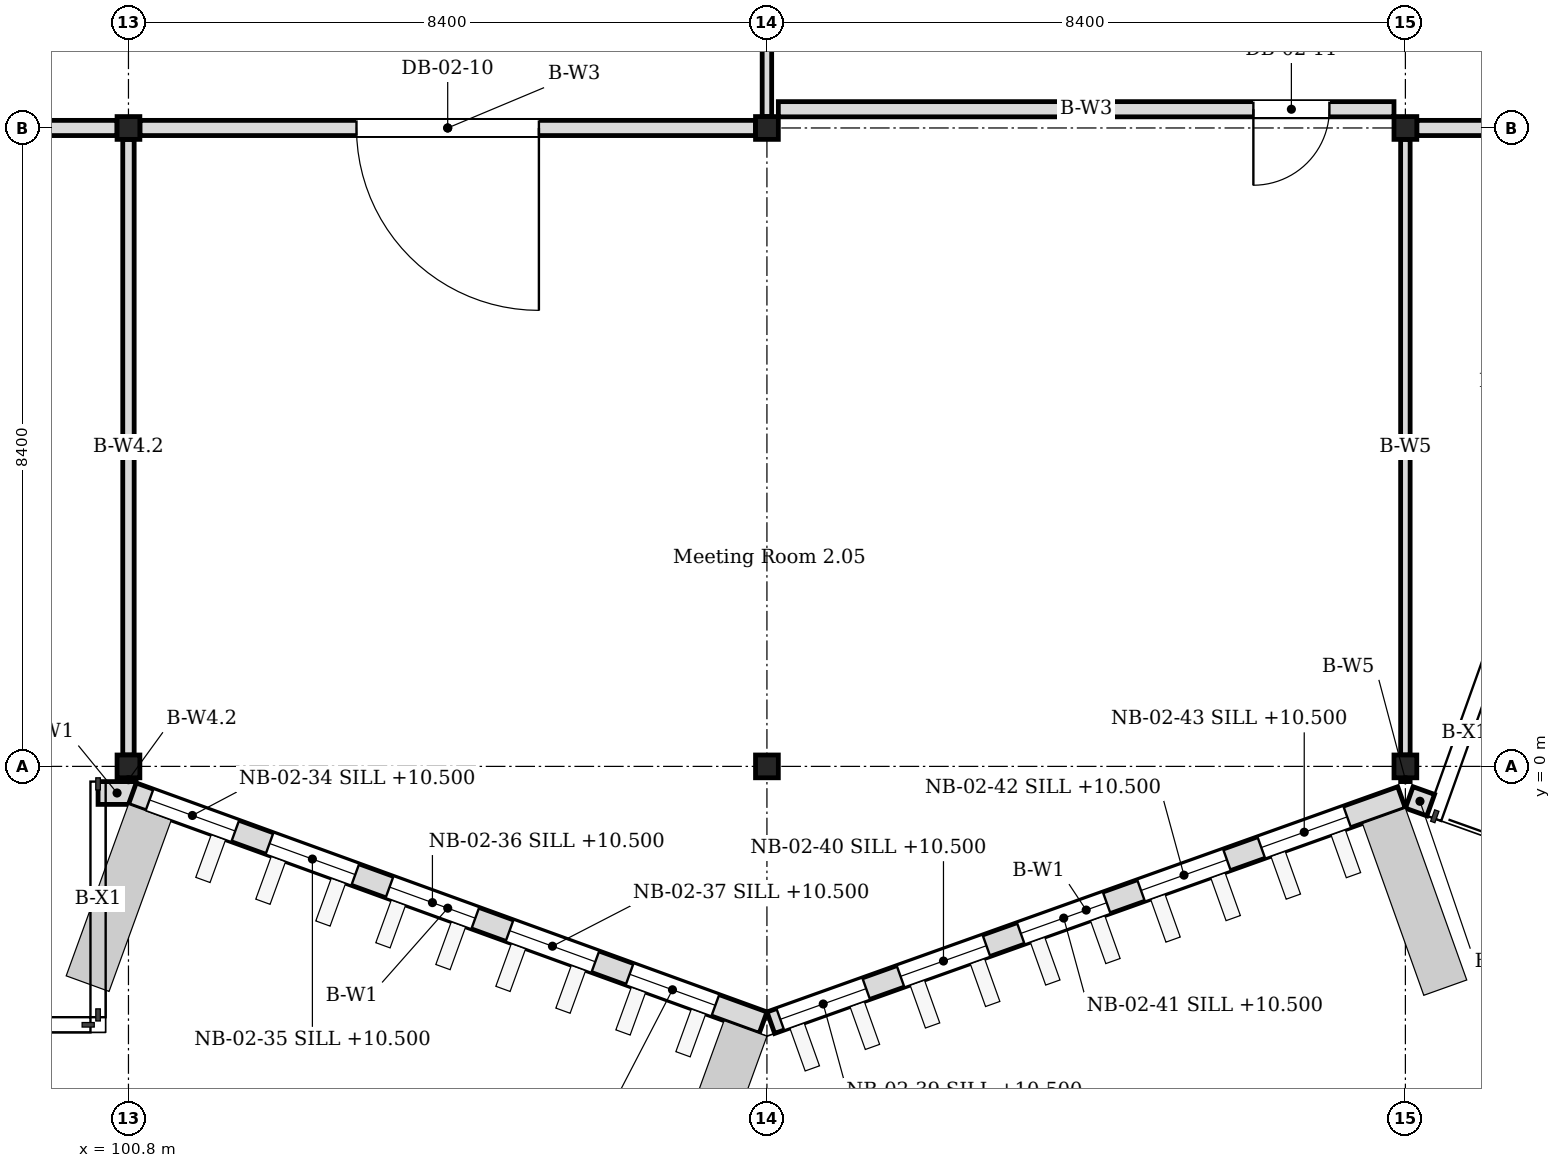
"""IFC4 building model, lengths in metres.
Left out: names, types, materials, properties, quantities, classifications, styles, units other than length and angle.
Written with IfcOpenShell. Run it as: python <this file> out.ifc"""

import sys

from ifc_helpers import new_model, si_unit, direction, frame, frame_2d, origin, origin_2d, place, context, subcontext, project, spatial, rectangle, i_section, extrude, element, fill, save


model = new_model("IFC4")
c1 = context("Model", 3, precision=1e-05, world=origin(), true_north=direction((0.0, 1.0)))
c2 = subcontext(c1, "Body", "Model", "MODEL_VIEW")
j1 = project(units=[si_unit("LENGTHUNIT", "METRE"), si_unit("PLANEANGLEUNIT", "RADIAN")], contexts=[c1])
p1 = place(None, origin())
s1 = spatial("IfcSite", under=j1, at=p1, CompositionType="ELEMENT")
p2 = place(p1, origin())
s2 = spatial("IfcBuilding", under=s1, at=p2, CompositionType="ELEMENT")
p3 = place(p2, frame((0.0, 0.0, 10.2)))
s3 = spatial("IfcBuildingStorey", under=s2, at=p3, CompositionType="ELEMENT", Elevation=10.2)
for number, where, z_axis, x_axis in (
    (1, (100.8, 0.0, 0.0), (0.0, 0.0, 1.0), (1.0, 0.0, 0.0)),
    (2, (100.8, 8.4, 0.0), (0.0, 0.0, 1.0), (1.0, 0.0, 0.0)),
    (3, (109.2, 0.0, 0.0), (0.0, 0.0, 1.0), (1.0, 0.0, 0.0)),
    (4, (109.2, 8.4, 0.0), (0.0, 0.0, 1.0), (1.0, 0.0, 0.0)),
    (5, (117.6, 0.0, 0.0), (0.0, 0.0, 1.0), (1.0, 0.0, 0.0)),
    (6, (117.6, 8.4, 0.0), (0.0, 0.0, 1.0), (1.0, 0.0, 0.0)),
):
    element("IfcColumn", number, at=place(p3, frame(where, z_axis=z_axis, x_axis=x_axis)), inside=s3, PredefinedType="COLUMN", context=c2, shape_type="SweptSolid", body=[
        extrude(i_section(OverallWidth=0.3, OverallDepth=0.3, WebThickness=0.01, FlangeThickness=0.015, FilletRadius=0.013, at=origin_2d()), origin(), (0.0, 0.0, 1.0), 4.2),
    ])
p4 = place(p3, frame((100.4, -0.35, 0.0), z_axis=(0.0, 0.0, 1.0), x_axis=(1.0, 0.0, 0.0)))
e7 = element("IfcWall", 7, at=p4, inside=s3, PredefinedType="SOLIDWALL", context=c2, shape_type="SweptSolid", body=[
    extrude(rectangle(XDim=0.5, YDim=0.3, at=frame_2d((0.25, 0.0))), origin(), (0.0, 0.0, 1.0), 4.05),
])
p5 = place(p3, frame((100.851, -0.359, 0.0), z_axis=(0.0, 0.0, 1.0), x_axis=(0.939953187971, -0.341303390584, 0.0)))
e8 = element("IfcWall", 8, at=p5, inside=s3, PredefinedType="SOLIDWALL", context=c2, shape_type="SweptSolid", body=[
    extrude(rectangle(XDim=8.828, YDim=0.3, at=frame_2d((4.414, 0.0))), origin(), (0.0, 0.0, 1.0), 4.05),
])
p6 = place(p5, frame((0.24, 0.0, 0.3)))
e9 = element("IfcOpeningElement", 9, at=p6, cuts=e8, PredefinedType="OPENING", context=c2, shape_type="SweptSolid", body=[
    extrude(rectangle(XDim=1.2, YDim=3.3, at=frame_2d((0.6, 1.65))), frame((0.0, 0.16, 0.0), z_axis=(0.0, -1.0, 0.0), x_axis=(1.0, 0.0, 0.0)), (0.0, 0.0, 1.0), 0.32),
])
p7 = place(p5, frame((1.92, 0.0, 0.3)))
e10 = element("IfcOpeningElement", 10, at=p7, cuts=e8, PredefinedType="OPENING", context=c2, shape_type="SweptSolid", body=[
    extrude(rectangle(XDim=1.2, YDim=3.3, at=frame_2d((0.6, 1.65))), frame((0.0, 0.16, 0.0), z_axis=(0.0, -1.0, 0.0), x_axis=(1.0, 0.0, 0.0)), (0.0, 0.0, 1.0), 0.32),
])
p8 = place(p5, frame((3.6, 0.0, 0.3)))
e11 = element("IfcOpeningElement", 11, at=p8, cuts=e8, PredefinedType="OPENING", context=c2, shape_type="SweptSolid", body=[
    extrude(rectangle(XDim=1.2, YDim=3.3, at=frame_2d((0.6, 1.65))), frame((0.0, 0.16, 0.0), z_axis=(0.0, -1.0, 0.0), x_axis=(1.0, 0.0, 0.0)), (0.0, 0.0, 1.0), 0.32),
])
p9 = place(p5, frame((5.28, 0.0, 0.3)))
e12 = element("IfcOpeningElement", 12, at=p9, cuts=e8, PredefinedType="OPENING", context=c2, shape_type="SweptSolid", body=[
    extrude(rectangle(XDim=1.2, YDim=3.3, at=frame_2d((0.6, 1.65))), frame((0.0, 0.16, 0.0), z_axis=(0.0, -1.0, 0.0), x_axis=(1.0, 0.0, 0.0)), (0.0, 0.0, 1.0), 0.32),
])
p10 = place(p5, frame((6.96, 0.0, 0.3)))
e13 = element("IfcOpeningElement", 13, at=p10, cuts=e8, PredefinedType="OPENING", context=c2, shape_type="SweptSolid", body=[
    extrude(rectangle(XDim=1.2, YDim=3.3, at=frame_2d((0.6, 1.65))), frame((0.0, 0.16, 0.0), z_axis=(0.0, -1.0, 0.0), x_axis=(1.0, 0.0, 0.0)), (0.0, 0.0, 1.0), 0.32),
])
p11 = place(p3, frame((109.251, -3.372, 0.0), z_axis=(0.0, 0.0, 1.0), x_axis=(0.941744418946, 0.336329376334, 0.0)))
e14 = element("IfcWall", 14, at=p11, inside=s3, PredefinedType="SOLIDWALL", context=c2, shape_type="SweptSolid", body=[
    extrude(rectangle(XDim=8.812, YDim=0.3, at=frame_2d((4.406, 0.0))), origin(), (0.0, 0.0, 1.0), 4.05),
])
p12 = place(p11, frame((0.132, 0.0, 0.3)))
e15 = element("IfcOpeningElement", 15, at=p12, cuts=e14, PredefinedType="OPENING", context=c2, shape_type="SweptSolid", body=[
    extrude(rectangle(XDim=1.2, YDim=3.3, at=frame_2d((0.6, 1.65))), frame((0.0, 0.16, 0.0), z_axis=(0.0, -1.0, 0.0), x_axis=(1.0, 0.0, 0.0)), (0.0, 0.0, 1.0), 0.32),
])
p13 = place(p11, frame((1.812, 0.0, 0.3)))
e16 = element("IfcOpeningElement", 16, at=p13, cuts=e14, PredefinedType="OPENING", context=c2, shape_type="SweptSolid", body=[
    extrude(rectangle(XDim=1.2, YDim=3.3, at=frame_2d((0.6, 1.65))), frame((0.0, 0.16, 0.0), z_axis=(0.0, -1.0, 0.0), x_axis=(1.0, 0.0, 0.0)), (0.0, 0.0, 1.0), 0.32),
])
p14 = place(p11, frame((3.492, 0.0, 0.3)))
e17 = element("IfcOpeningElement", 17, at=p14, cuts=e14, PredefinedType="OPENING", context=c2, shape_type="SweptSolid", body=[
    extrude(rectangle(XDim=1.2, YDim=3.3, at=frame_2d((0.6, 1.65))), frame((0.0, 0.16, 0.0), z_axis=(0.0, -1.0, 0.0), x_axis=(1.0, 0.0, 0.0)), (0.0, 0.0, 1.0), 0.32),
])
p15 = place(p11, frame((5.172, 0.0, 0.3)))
e18 = element("IfcOpeningElement", 18, at=p15, cuts=e14, PredefinedType="OPENING", context=c2, shape_type="SweptSolid", body=[
    extrude(rectangle(XDim=1.2, YDim=3.3, at=frame_2d((0.6, 1.65))), frame((0.0, 0.16, 0.0), z_axis=(0.0, -1.0, 0.0), x_axis=(1.0, 0.0, 0.0)), (0.0, 0.0, 1.0), 0.32),
])
p16 = place(p11, frame((6.852, 0.0, 0.3)))
e19 = element("IfcOpeningElement", 19, at=p16, cuts=e14, PredefinedType="OPENING", context=c2, shape_type="SweptSolid", body=[
    extrude(rectangle(XDim=1.2, YDim=3.3, at=frame_2d((0.6, 1.65))), frame((0.0, 0.16, 0.0), z_axis=(0.0, -1.0, 0.0), x_axis=(1.0, 0.0, 0.0)), (0.0, 0.0, 1.0), 0.32),
])
p17 = place(p3, frame((117.65, -0.409, 0.0), z_axis=(0.0, 0.0, 1.0), x_axis=(0.941889038699, -0.335924156289, 0.0)))
e20 = element("IfcWall", 20, at=p17, inside=s3, PredefinedType="SOLIDWALL", context=c2, shape_type="SweptSolid", body=[
    extrude(rectangle(XDim=0.3, YDim=0.3, at=frame_2d((0.15, 0.0))), origin(), (0.0, 0.0, 1.0), 4.05),
])
p18 = place(p3, frame((92.55, 8.4, 0.0), z_axis=(0.0, 0.0, 1.0), x_axis=(1.0, 0.0, 0.0)))
e21 = element("IfcWall", 21, at=p18, inside=s3, PredefinedType="PARTITIONING", context=c2, shape_type="SweptSolid", body=[
    extrude(rectangle(XDim=8.1, YDim=0.2, at=frame_2d((4.05, 0.0))), origin(), (0.0, 0.0, 1.0), 3.35),
])
p19 = place(p18, frame((3.55, 0.0, 0.0)))
e22 = element("IfcOpeningElement", 22, at=p19, cuts=e21, PredefinedType="OPENING", context=c2, shape_type="SweptSolid", body=[
    extrude(rectangle(XDim=1.0, YDim=2.1, at=frame_2d((0.5, 1.05))), frame((0.0, 0.11, 0.0), z_axis=(0.0, -1.0, 0.0), x_axis=(1.0, 0.0, 0.0)), (0.0, 0.0, 1.0), 0.22),
])
p20 = place(p3, frame((100.95, 8.4, 0.0), z_axis=(0.0, 0.0, 1.0), x_axis=(1.0, 0.0, 0.0)))
e23 = element("IfcWall", 23, at=p20, inside=s3, PredefinedType="PARTITIONING", context=c2, shape_type="SweptSolid", body=[
    extrude(rectangle(XDim=8.1, YDim=0.2, at=frame_2d((4.05, 0.0))), origin(), (0.0, 0.0, 1.0), 3.35),
])
p21 = place(p20, frame((2.85, 0.0, 0.0)))
e24 = element("IfcOpeningElement", 24, at=p21, cuts=e23, PredefinedType="OPENING", context=c2, shape_type="SweptSolid", body=[
    extrude(rectangle(XDim=2.4, YDim=2.2, at=frame_2d((1.2, 1.1))), frame((0.0, 0.11, 0.0), z_axis=(0.0, -1.0, 0.0), x_axis=(1.0, 0.0, 0.0)), (0.0, 0.0, 1.0), 0.22),
])
p22 = place(p3, frame((109.35, 8.646, 0.0), z_axis=(0.0, 0.0, 1.0), x_axis=(1.0, 0.0, 0.0)))
e25 = element("IfcWall", 25, at=p22, inside=s3, PredefinedType="PARTITIONING", context=c2, shape_type="SweptSolid", body=[
    extrude(rectangle(XDim=8.1, YDim=0.2, at=frame_2d((4.05, 0.0))), origin(), (0.0, 0.0, 1.0), 3.35),
])
p23 = place(p22, frame((6.25, 0.0, 0.0)))
e26 = element("IfcOpeningElement", 26, at=p23, cuts=e25, PredefinedType="OPENING", context=c2, shape_type="SweptSolid", body=[
    extrude(rectangle(XDim=1.0, YDim=2.1, at=frame_2d((0.5, 1.05))), frame((0.0, 0.11, 0.0), z_axis=(0.0, -1.0, 0.0), x_axis=(1.0, 0.0, 0.0)), (0.0, 0.0, 1.0), 0.22),
])
p24 = place(p3, frame((117.75, 8.4, 0.0), z_axis=(0.0, 0.0, 1.0), x_axis=(1.0, 0.0, 0.0)))
e27 = element("IfcWall", 27, at=p24, inside=s3, PredefinedType="PARTITIONING", context=c2, shape_type="SweptSolid", body=[
    extrude(rectangle(XDim=8.1, YDim=0.2, at=frame_2d((4.05, 0.0))), origin(), (0.0, 0.0, 1.0), 3.35),
])
p25 = place(p24, frame((2.85, 0.0, 0.0)))
e28 = element("IfcOpeningElement", 28, at=p25, cuts=e27, PredefinedType="OPENING", context=c2, shape_type="SweptSolid", body=[
    extrude(rectangle(XDim=2.4, YDim=2.2, at=frame_2d((1.2, 1.1))), frame((0.0, 0.11, 0.0), z_axis=(0.0, -1.0, 0.0), x_axis=(1.0, 0.0, 0.0)), (0.0, 0.0, 1.0), 0.22),
])
p26 = place(p3, frame((100.8, -0.2, 0.0), z_axis=(0.0, 0.0, 1.0), x_axis=(0.0, 1.0, 0.0)))
e29 = element("IfcWall", 29, at=p26, inside=s3, PredefinedType="PARTITIONING", context=c2, shape_type="SweptSolid", body=[
    extrude(rectangle(XDim=0.05, YDim=0.15, at=frame_2d((0.025, 0.0))), origin(), (0.0, 0.0, 1.0), 3.35),
])
p27 = place(p3, frame((100.8, 0.15, 0.0), z_axis=(0.0, 0.0, 1.0), x_axis=(0.0, 1.0, 0.0)))
e30 = element("IfcWall", 30, at=p27, inside=s3, PredefinedType="PARTITIONING", context=c2, shape_type="SweptSolid", body=[
    extrude(rectangle(XDim=8.1, YDim=0.15, at=frame_2d((4.05, 0.0))), origin(), (0.0, 0.0, 1.0), 3.35),
])
p28 = place(p3, frame((109.2, 8.55, 0.0), z_axis=(0.0, 0.0, 1.0), x_axis=(0.0, 1.0, 0.0)))
e31 = element("IfcWall", 31, at=p28, inside=s3, PredefinedType="PARTITIONING", context=c2, shape_type="SweptSolid", body=[
    extrude(rectangle(XDim=8.1, YDim=0.125, at=frame_2d((4.05, 0.0))), origin(), (0.0, 0.0, 1.0), 3.35),
])
p29 = place(p28, frame((2.85, 0.0, 0.0)))
e32 = element("IfcOpeningElement", 32, at=p29, cuts=e31, PredefinedType="OPENING", context=c2, shape_type="SweptSolid", body=[
    extrude(rectangle(XDim=2.4, YDim=2.2, at=frame_2d((1.2, 1.1))), frame((0.0, 0.073, 0.0), z_axis=(0.0, -1.0, 0.0), x_axis=(1.0, 0.0, 0.0)), (0.0, 0.0, 1.0), 0.145),
])
p30 = place(p3, frame((117.6, -0.2, 0.0), z_axis=(0.0, 0.0, 1.0), x_axis=(0.0, 1.0, 0.0)))
e33 = element("IfcWall", 33, at=p30, inside=s3, PredefinedType="MOVABLE", context=c2, shape_type="SweptSolid", body=[
    extrude(rectangle(XDim=0.05, YDim=0.125, at=frame_2d((0.025, 0.0))), origin(), (0.0, 0.0, 1.0), 3.35),
])
p31 = place(p3, frame((117.6, 0.15, 0.0), z_axis=(0.0, 0.0, 1.0), x_axis=(0.0, 1.0, 0.0)))
e34 = element("IfcWall", 34, at=p31, inside=s3, PredefinedType="MOVABLE", context=c2, shape_type="SweptSolid", body=[
    extrude(rectangle(XDim=8.1, YDim=0.125, at=frame_2d((4.05, 0.0))), origin(), (0.0, 0.0, 1.0), 3.35),
])
p32 = place(p6, origin())
e35 = element("IfcWindow", 35, at=p32, inside=s3, PartitioningType="TRIPLE_PANEL_VERTICAL", PredefinedType="WINDOW", context=c2, shape_type="SweptSolid", body=[
    extrude(rectangle(XDim=1.2, YDim=3.3, at=frame_2d((0.6, 1.65))), frame((0.0, 0.03, 0.0), z_axis=(0.0, -1.0, 0.0), x_axis=(1.0, 0.0, 0.0)), (0.0, 0.0, 1.0), 0.06),
])
fill(e9, e35)
p33 = place(p7, origin())
e36 = element("IfcWindow", 36, at=p33, inside=s3, PartitioningType="TRIPLE_PANEL_VERTICAL", PredefinedType="WINDOW", context=c2, shape_type="SweptSolid", body=[
    extrude(rectangle(XDim=1.2, YDim=3.3, at=frame_2d((0.6, 1.65))), frame((0.0, 0.03, 0.0), z_axis=(0.0, -1.0, 0.0), x_axis=(1.0, 0.0, 0.0)), (0.0, 0.0, 1.0), 0.06),
])
fill(e10, e36)
p34 = place(p8, origin())
e37 = element("IfcWindow", 37, at=p34, inside=s3, PartitioningType="TRIPLE_PANEL_VERTICAL", PredefinedType="WINDOW", context=c2, shape_type="SweptSolid", body=[
    extrude(rectangle(XDim=1.2, YDim=3.3, at=frame_2d((0.6, 1.65))), frame((0.0, 0.03, 0.0), z_axis=(0.0, -1.0, 0.0), x_axis=(1.0, 0.0, 0.0)), (0.0, 0.0, 1.0), 0.06),
])
fill(e11, e37)
p35 = place(p9, origin())
e38 = element("IfcWindow", 38, at=p35, inside=s3, PartitioningType="TRIPLE_PANEL_VERTICAL", PredefinedType="WINDOW", context=c2, shape_type="SweptSolid", body=[
    extrude(rectangle(XDim=1.2, YDim=3.3, at=frame_2d((0.6, 1.65))), frame((0.0, 0.03, 0.0), z_axis=(0.0, -1.0, 0.0), x_axis=(1.0, 0.0, 0.0)), (0.0, 0.0, 1.0), 0.06),
])
fill(e12, e38)
p36 = place(p10, origin())
e39 = element("IfcWindow", 39, at=p36, inside=s3, PartitioningType="TRIPLE_PANEL_VERTICAL", PredefinedType="WINDOW", context=c2, shape_type="SweptSolid", body=[
    extrude(rectangle(XDim=1.2, YDim=3.3, at=frame_2d((0.6, 1.65))), frame((0.0, 0.03, 0.0), z_axis=(0.0, -1.0, 0.0), x_axis=(1.0, 0.0, 0.0)), (0.0, 0.0, 1.0), 0.06),
])
fill(e13, e39)
p37 = place(p12, origin())
e40 = element("IfcWindow", 40, at=p37, inside=s3, PartitioningType="TRIPLE_PANEL_VERTICAL", PredefinedType="WINDOW", context=c2, shape_type="SweptSolid", body=[
    extrude(rectangle(XDim=1.2, YDim=3.3, at=frame_2d((0.6, 1.65))), frame((0.0, 0.03, 0.0), z_axis=(0.0, -1.0, 0.0), x_axis=(1.0, 0.0, 0.0)), (0.0, 0.0, 1.0), 0.06),
])
fill(e15, e40)
p38 = place(p13, origin())
e41 = element("IfcWindow", 41, at=p38, inside=s3, PartitioningType="TRIPLE_PANEL_VERTICAL", PredefinedType="WINDOW", context=c2, shape_type="SweptSolid", body=[
    extrude(rectangle(XDim=1.2, YDim=3.3, at=frame_2d((0.6, 1.65))), frame((0.0, 0.03, 0.0), z_axis=(0.0, -1.0, 0.0), x_axis=(1.0, 0.0, 0.0)), (0.0, 0.0, 1.0), 0.06),
])
fill(e16, e41)
p39 = place(p14, origin())
e42 = element("IfcWindow", 42, at=p39, inside=s3, PartitioningType="TRIPLE_PANEL_VERTICAL", PredefinedType="WINDOW", context=c2, shape_type="SweptSolid", body=[
    extrude(rectangle(XDim=1.2, YDim=3.3, at=frame_2d((0.6, 1.65))), frame((0.0, 0.03, 0.0), z_axis=(0.0, -1.0, 0.0), x_axis=(1.0, 0.0, 0.0)), (0.0, 0.0, 1.0), 0.06),
])
fill(e17, e42)
p40 = place(p15, origin())
e43 = element("IfcWindow", 43, at=p40, inside=s3, PartitioningType="TRIPLE_PANEL_VERTICAL", PredefinedType="WINDOW", context=c2, shape_type="SweptSolid", body=[
    extrude(rectangle(XDim=1.2, YDim=3.3, at=frame_2d((0.6, 1.65))), frame((0.0, 0.03, 0.0), z_axis=(0.0, -1.0, 0.0), x_axis=(1.0, 0.0, 0.0)), (0.0, 0.0, 1.0), 0.06),
])
fill(e18, e43)
p41 = place(p16, origin())
e44 = element("IfcWindow", 44, at=p41, inside=s3, PartitioningType="TRIPLE_PANEL_VERTICAL", PredefinedType="WINDOW", context=c2, shape_type="SweptSolid", body=[
    extrude(rectangle(XDim=1.2, YDim=3.3, at=frame_2d((0.6, 1.65))), frame((0.0, 0.03, 0.0), z_axis=(0.0, -1.0, 0.0), x_axis=(1.0, 0.0, 0.0)), (0.0, 0.0, 1.0), 0.06),
])
fill(e19, e44)
p42 = place(p21, origin())
e45 = element("IfcDoor", 45, at=p42, inside=s3, OperationType="DOUBLE_DOOR_SINGLE_SWING", PredefinedType="DOOR", context=c2, shape_type="SweptSolid", body=[
    extrude(rectangle(XDim=2.4, YDim=2.2, at=frame_2d((1.2, 1.1))), frame((0.0, 0.025, 0.0), z_axis=(0.0, -1.0, 0.0), x_axis=(1.0, 0.0, 0.0)), (0.0, 0.0, 1.0), 0.05),
])
fill(e24, e45)
p43 = place(p23, origin())
e46 = element("IfcDoor", 46, at=p43, inside=s3, OperationType="SINGLE_SWING_LEFT", PredefinedType="DOOR", context=c2, shape_type="SweptSolid", body=[
    extrude(rectangle(XDim=1.0, YDim=2.1, at=frame_2d((0.5, 1.05))), frame((0.0, 0.025, 0.0), z_axis=(0.0, -1.0, 0.0), x_axis=(1.0, 0.0, 0.0)), (0.0, 0.0, 1.0), 0.05),
])
fill(e26, e46)
save(model, sys.argv[1])
